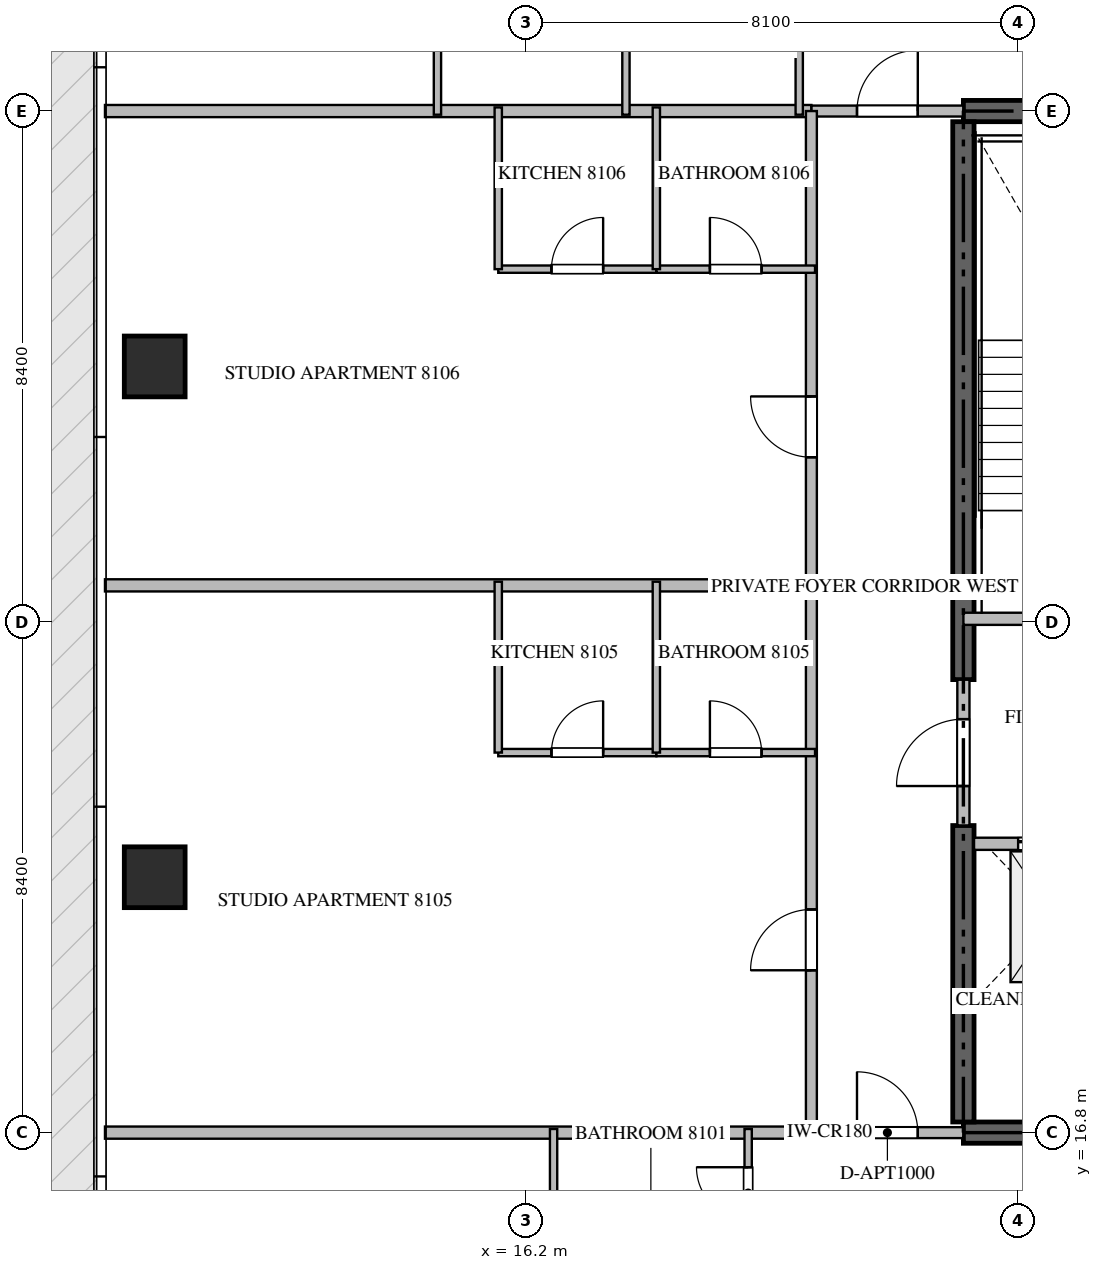
"""IFC4 building model, lengths in metres.
Left out: names, types, materials, properties, quantities, classifications, styles, units other than length and angle.
Written with IfcOpenShell. Run it as: python <this file> out.ifc"""

import sys

from ifc_helpers import new_model, si_unit, direction, frame, frame_2d, origin, origin_2d, place, context, subcontext, project, spatial, rectangle, extrude, source, transform, mapped, element, fill, save


model = new_model("IFC4")
c1 = context("Model", 3, precision=1e-05, world=origin(), true_north=direction((0.0, 1.0)))
c2 = subcontext(c1, "Body", "Model", "MODEL_VIEW")
j1 = project(units=[si_unit("LENGTHUNIT", "METRE"), si_unit("PLANEANGLEUNIT", "RADIAN")], contexts=[c1])
p1 = place(None, origin())
s1 = spatial("IfcSite", under=j1, at=p1, CompositionType="ELEMENT")
p2 = place(p1, origin())
s2 = spatial("IfcBuilding", under=s1, at=p2, CompositionType="ELEMENT")
p3 = place(p2, frame((0.0, 0.0, 325.85)))
s3 = spatial("IfcBuildingStorey", under=s2, at=p3, CompositionType="ELEMENT", Elevation=325.85)
for number, where, z_axis, x_axis in (
    (1, (23.4, 16.8, -0.26), (0.0, 0.0, 1.0), (1.0, 0.0, 0.0)),
    (2, (41.4, 33.6, -0.26), (0.0, 0.0, 1.0), (-1.0, 0.0, 0.0)),
):
    element("IfcWall", number, at=place(p3, frame(where, z_axis=z_axis, x_axis=x_axis)), inside=s3, PredefinedType="SHEAR", context=c2, shape_type="SweptSolid", body=[
        extrude(rectangle(XDim=18.0, YDim=0.35, at=frame_2d((9.0, 0.0))), origin(), (0.0, 0.0, 1.0), 4.048),
    ])
p4 = place(p3, frame((23.4, 16.975, -0.26), z_axis=(0.0, 0.0, 1.0), x_axis=(0.0, 1.0, 0.0)))
e3 = element("IfcWall", 3, at=p4, inside=s3, PredefinedType="SHEAR", context=c2, shape_type="SweptSolid", body=[
    extrude(rectangle(XDim=4.875, YDim=0.35, at=frame_2d((2.438, 0.0))), origin(), (0.0, 0.0, 1.0), 4.048),
])
p5 = place(p3, frame((23.4, 24.25, -0.26), z_axis=(0.0, 0.0, 1.0), x_axis=(0.0, 1.0, 0.0)))
e4 = element("IfcWall", 4, at=p5, inside=s3, PredefinedType="SHEAR", context=c2, shape_type="SweptSolid", body=[
    extrude(rectangle(XDim=9.175, YDim=0.35, at=frame_2d((4.587, 0.0))), origin(), (0.0, 0.0, 1.0), 4.048),
])
m1 = source(origin(), c2, "Body", "SweptSolid", [
    extrude(rectangle(XDim=1.0, YDim=1.0, at=origin_2d()), origin(), (0.0, 0.0, 1.0), 4.05),
])
for number, where, z_axis, x_axis in (
    (5, (10.1, 21.0, -0.26), (0.0, 0.0, 1.0), (1.0, 0.0, 0.0)),
    (6, (10.1, 29.4, -0.26), (0.0, 0.0, 1.0), (1.0, 0.0, 0.0)),
):
    element("IfcColumn", number, at=place(p3, frame(where, z_axis=z_axis, x_axis=x_axis)), inside=s3, PredefinedType="COLUMN", context=c2, shape_type="MappedRepresentation", body=[
        mapped(m1, transform((0.0, 0.0, 0.0), scale=1.0)),
    ])
p6 = place(p3, frame((23.4, 25.25, 0.0), z_axis=(0.0, 0.0, 1.0), x_axis=(1.0, 0.0, 0.0)))
e7 = element("IfcWall", 7, at=p6, inside=s3, PredefinedType="STANDARD", context=c2, shape_type="SweptSolid", body=[
    extrude(rectangle(XDim=4.45, YDim=0.2, at=frame_2d((2.225, 0.0))), origin(), (0.0, 0.0, 1.0), 3.79),
])
p7 = place(p6, frame((1.65, 0.0, 0.0)))
e8 = element("IfcOpeningElement", 8, at=p7, cuts=e7, PredefinedType="OPENING", context=c2, shape_type="SweptSolid", body=[
    extrude(rectangle(XDim=1.1, YDim=2.15, at=frame_2d((0.55, 1.075))), frame((0.0, 0.11, 0.0), z_axis=(0.0, -1.0, 0.0), x_axis=(1.0, 0.0, 0.0)), (0.0, 0.0, 1.0), 0.22),
])
p8 = place(p3, frame((23.575, 21.55, 0.0), z_axis=(0.0, 0.0, 1.0), x_axis=(1.0, 0.0, 0.0)))
e9 = element("IfcWall", 9, at=p8, inside=s3, PredefinedType="STANDARD", context=c2, shape_type="SweptSolid", body=[
    extrude(rectangle(XDim=2.475, YDim=0.2, at=frame_2d((1.238, 0.0))), origin(), (0.0, 0.0, 1.0), 3.79),
])
p9 = place(p8, frame((0.725, 0.0, 0.0)))
e10 = element("IfcOpeningElement", 10, at=p9, cuts=e9, PredefinedType="OPENING", context=c2, shape_type="SweptSolid", body=[
    extrude(rectangle(XDim=1.2, YDim=2.2, at=frame_2d((0.6, 1.1))), frame((0.0, 0.11, 0.0), z_axis=(0.0, -1.0, 0.0), x_axis=(1.0, 0.0, 0.0)), (0.0, 0.0, 1.0), 0.22),
])
p10 = place(p3, frame((23.575, 19.05, 0.0), z_axis=(0.0, 0.0, 1.0), x_axis=(1.0, 0.0, 0.0)))
e11 = element("IfcWall", 11, at=p10, inside=s3, PredefinedType="STANDARD", context=c2, shape_type="SweptSolid", body=[
    extrude(rectangle(XDim=2.475, YDim=0.2, at=frame_2d((1.238, 0.0))), origin(), (0.0, 0.0, 1.0), 3.79),
])
p11 = place(p3, frame((23.4, 21.852, 0.0), z_axis=(0.0, 0.0, 1.0), x_axis=(0.0, 1.0, 0.0)))
e12 = element("IfcWall", 12, at=p11, inside=s3, PredefinedType="STANDARD", context=c2, shape_type="SweptSolid", body=[
    extrude(rectangle(XDim=2.396, YDim=0.2, at=frame_2d((1.198, 0.0))), origin(), (0.0, 0.0, 1.0), 3.79),
])
p12 = place(p11, frame((0.648, 0.0, 0.0)))
e13 = element("IfcOpeningElement", 13, at=p12, cuts=e12, PredefinedType="OPENING", context=c2, shape_type="SweptSolid", body=[
    extrude(rectangle(XDim=1.1, YDim=2.15, at=frame_2d((0.55, 1.075))), frame((0.0, 0.11, 0.0), z_axis=(0.0, -1.0, 0.0), x_axis=(1.0, 0.0, 0.0)), (0.0, 0.0, 1.0), 0.22),
])
p13 = place(p3, frame((9.282, 25.8, 0.0), z_axis=(0.0, 0.0, 1.0), x_axis=(1.0, 0.0, 0.0)))
e14 = element("IfcWall", 14, at=p13, inside=s3, PredefinedType="PARTITIONING", context=c2, shape_type="SweptSolid", body=[
    extrude(rectangle(XDim=11.738, YDim=0.2, at=frame_2d((5.869, 0.0))), origin(), (0.0, 0.0, 1.0), 3.79),
])
for number, where, z_axis, x_axis in (
    (15, (9.282, 16.8, 0.0), (0.0, 0.0, 1.0), (1.0, 0.0, 0.0)),
    (16, (9.282, 33.6, 0.0), (0.0, 0.0, 1.0), (1.0, 0.0, 0.0)),
):
    element("IfcWall", number, at=place(p3, frame(where, z_axis=z_axis, x_axis=x_axis)), inside=s3, PredefinedType="PARTITIONING", context=c2, shape_type="SweptSolid", body=[
        extrude(rectangle(XDim=11.618, YDim=0.2, at=frame_2d((5.809, 0.0))), origin(), (0.0, 0.0, 1.0), 3.79),
    ])
p14 = place(p3, frame((20.902, 16.8, 0.0), z_axis=(0.0, 0.0, 1.0), x_axis=(1.0, 0.0, 0.0)))
e17 = element("IfcWall", 17, at=p14, inside=s3, PredefinedType="PARTITIONING", context=c2, shape_type="SweptSolid", body=[
    extrude(rectangle(XDim=2.496, YDim=0.18, at=frame_2d((1.248, 0.0))), origin(), (0.0, 0.0, 1.0), 3.79),
])
p15 = place(p14, frame((0.748, 0.0, 0.0)))
e18 = element("IfcOpeningElement", 18, at=p15, cuts=e17, PredefinedType="OPENING", context=c2, shape_type="SweptSolid", body=[
    extrude(rectangle(XDim=1.0, YDim=2.15, at=frame_2d((0.5, 1.075))), frame((0.0, 0.1, 0.0), z_axis=(0.0, -1.0, 0.0), x_axis=(1.0, 0.0, 0.0)), (0.0, 0.0, 1.0), 0.2),
])
p16 = place(p3, frame((20.902, 33.6, 0.0), z_axis=(0.0, 0.0, 1.0), x_axis=(1.0, 0.0, 0.0)))
e19 = element("IfcWall", 19, at=p16, inside=s3, PredefinedType="PARTITIONING", context=c2, shape_type="SweptSolid", body=[
    extrude(rectangle(XDim=2.496, YDim=0.18, at=frame_2d((1.248, 0.0))), origin(), (0.0, 0.0, 1.0), 3.79),
])
p17 = place(p16, frame((0.748, 0.0, 0.0)))
e20 = element("IfcOpeningElement", 20, at=p17, cuts=e19, PredefinedType="OPENING", context=c2, shape_type="SweptSolid", body=[
    extrude(rectangle(XDim=1.0, YDim=2.15, at=frame_2d((0.5, 1.075))), frame((0.0, 0.1, 0.0), z_axis=(0.0, -1.0, 0.0), x_axis=(1.0, 0.0, 0.0)), (0.0, 0.0, 1.0), 0.2),
])
p18 = place(p3, frame((20.9, 16.8, 0.0), z_axis=(0.0, 0.0, 1.0), x_axis=(0.0, 1.0, 0.0)))
e21 = element("IfcWall", 21, at=p18, inside=s3, PredefinedType="PARTITIONING", context=c2, shape_type="SweptSolid", body=[
    extrude(rectangle(XDim=16.8, YDim=0.18, at=frame_2d((8.4, 0.0))), origin(), (0.0, 0.0, 1.0), 3.79),
])
p19 = place(p18, frame((2.67, 0.0, 0.0)))
e22 = element("IfcOpeningElement", 22, at=p19, cuts=e21, PredefinedType="OPENING", context=c2, shape_type="SweptSolid", body=[
    extrude(rectangle(XDim=1.0, YDim=2.15, at=frame_2d((0.5, 1.075))), frame((0.0, 0.1, 0.0), z_axis=(0.0, -1.0, 0.0), x_axis=(1.0, 0.0, 0.0)), (0.0, 0.0, 1.0), 0.2),
])
p20 = place(p18, frame((11.107, 0.0, 0.0)))
e23 = element("IfcOpeningElement", 23, at=p20, cuts=e21, PredefinedType="OPENING", context=c2, shape_type="SweptSolid", body=[
    extrude(rectangle(XDim=1.0, YDim=2.15, at=frame_2d((0.5, 1.075))), frame((0.0, 0.1, 0.0), z_axis=(0.0, -1.0, 0.0), x_axis=(1.0, 0.0, 0.0)), (0.0, 0.0, 1.0), 0.2),
])
p21 = place(p3, frame((16.66, 14.75, 0.0), z_axis=(0.0, 0.0, 1.0), x_axis=(0.0, 1.0, 0.0)))
e24 = element("IfcWall", 24, at=p21, inside=s3, PredefinedType="PARTITIONING", context=c2, shape_type="SweptSolid", body=[
    extrude(rectangle(XDim=2.11, YDim=0.12, at=frame_2d((1.055, 0.0))), origin(), (0.0, 0.0, 1.0), 3.79),
])
p22 = place(p3, frame((19.86, 14.752, 0.0), z_axis=(0.0, 0.0, 1.0), x_axis=(0.0, 1.0, 0.0)))
e25 = element("IfcWall", 25, at=p22, inside=s3, PredefinedType="PARTITIONING", context=c2, shape_type="SweptSolid", body=[
    extrude(rectangle(XDim=2.108, YDim=0.12, at=frame_2d((1.054, 0.0))), origin(), (0.0, 0.0, 1.0), 3.79),
])
p23 = place(p22, frame((0.629, 0.0, 0.0)))
e26 = element("IfcOpeningElement", 26, at=p23, cuts=e25, PredefinedType="OPENING", context=c2, shape_type="SweptSolid", body=[
    extrude(rectangle(XDim=0.85, YDim=2.1, at=frame_2d((0.425, 1.05))), frame((0.0, 0.07, 0.0), z_axis=(0.0, -1.0, 0.0), x_axis=(1.0, 0.0, 0.0)), (0.0, 0.0, 1.0), 0.14),
])
p24 = place(p3, frame((20.7, 36.35, 0.0), z_axis=(0.0, 0.0, 1.0), x_axis=(0.0, -1.0, 0.0)))
e27 = element("IfcWall", 27, at=p24, inside=s3, PredefinedType="PARTITIONING", context=c2, shape_type="SweptSolid", body=[
    extrude(rectangle(XDim=2.81, YDim=0.12, at=frame_2d((1.405, 0.0))), origin(), (0.0, 0.0, 1.0), 3.79),
])
p25 = place(p3, frame((14.75, 37.807, 0.0), z_axis=(0.0, 0.0, 1.0), x_axis=(0.0, -1.0, 0.0)))
e28 = element("IfcWall", 28, at=p25, inside=s3, PredefinedType="PARTITIONING", context=c2, shape_type="SweptSolid", body=[
    extrude(rectangle(XDim=4.267, YDim=0.12, at=frame_2d((2.133, 0.0))), origin(), (0.0, 0.0, 1.0), 3.79),
])
p26 = place(p3, frame((17.85, 37.805, 0.0), z_axis=(0.0, 0.0, 1.0), x_axis=(0.0, -1.0, 0.0)))
e29 = element("IfcWall", 29, at=p26, inside=s3, PredefinedType="PARTITIONING", context=c2, shape_type="SweptSolid", body=[
    extrude(rectangle(XDim=4.265, YDim=0.12, at=frame_2d((2.132, 0.0))), origin(), (0.0, 0.0, 1.0), 3.372),
])
p27 = place(p26, frame((1.848, 0.0, 0.0)))
e30 = element("IfcOpeningElement", 30, at=p27, cuts=e29, PredefinedType="OPENING", context=c2, shape_type="SweptSolid", body=[
    extrude(rectangle(XDim=0.85, YDim=2.1, at=frame_2d((0.425, 1.05))), frame((0.0, 0.07, 0.0), z_axis=(0.0, -1.0, 0.0), x_axis=(1.0, 0.0, 0.0)), (0.0, 0.0, 1.0), 0.14),
])
p28 = place(p3, frame((15.75, 23.05, 0.0), z_axis=(0.0, 0.0, 1.0), x_axis=(1.0, 0.0, 0.0)))
e31 = element("IfcWall", 31, at=p28, inside=s3, PredefinedType="PARTITIONING", context=c2, shape_type="SweptSolid", body=[
    extrude(rectangle(XDim=2.6, YDim=0.12, at=frame_2d((1.3, 0.0))), origin(), (0.0, 0.0, 1.0), 3.79),
])
p29 = place(p28, frame((0.875, 0.0, 0.0)))
e32 = element("IfcOpeningElement", 32, at=p29, cuts=e31, PredefinedType="OPENING", context=c2, shape_type="SweptSolid", body=[
    extrude(rectangle(XDim=0.85, YDim=2.1, at=frame_2d((0.425, 1.05))), frame((0.0, 0.07, 0.0), z_axis=(0.0, -1.0, 0.0), x_axis=(1.0, 0.0, 0.0)), (0.0, 0.0, 1.0), 0.14),
])
p30 = place(p3, frame((18.352, 23.05, 0.0), z_axis=(0.0, 0.0, 1.0), x_axis=(1.0, 0.0, 0.0)))
e33 = element("IfcWall", 33, at=p30, inside=s3, PredefinedType="PARTITIONING", context=c2, shape_type="SweptSolid", body=[
    extrude(rectangle(XDim=2.608, YDim=0.12, at=frame_2d((1.304, 0.0))), origin(), (0.0, 0.0, 1.0), 3.79),
])
p31 = place(p30, frame((0.879, 0.0, 0.0)))
e34 = element("IfcOpeningElement", 34, at=p31, cuts=e33, PredefinedType="OPENING", context=c2, shape_type="SweptSolid", body=[
    extrude(rectangle(XDim=0.85, YDim=2.1, at=frame_2d((0.425, 1.05))), frame((0.0, 0.07, 0.0), z_axis=(0.0, -1.0, 0.0), x_axis=(1.0, 0.0, 0.0)), (0.0, 0.0, 1.0), 0.14),
])
for number, where, z_axis, x_axis in (
    (35, (18.35, 23.05, 0.0), (0.0, 0.0, 1.0), (0.0, 1.0, 0.0)),
    (36, (15.75, 23.05, 0.0), (0.0, 0.0, 1.0), (0.0, 1.0, 0.0)),
):
    element("IfcWall", number, at=place(p3, frame(where, z_axis=z_axis, x_axis=x_axis)), inside=s3, PredefinedType="PARTITIONING", context=c2, shape_type="SweptSolid", body=[
        extrude(rectangle(XDim=2.81, YDim=0.12, at=frame_2d((1.405, 0.0))), origin(), (0.0, 0.0, 1.0), 3.79),
    ])
p32 = place(p3, frame((15.75, 31.0, 0.0), z_axis=(0.0, 0.0, 1.0), x_axis=(1.0, 0.0, 0.0)))
e37 = element("IfcWall", 37, at=p32, inside=s3, PredefinedType="PARTITIONING", context=c2, shape_type="SweptSolid", body=[
    extrude(rectangle(XDim=2.6, YDim=0.12, at=frame_2d((1.3, 0.0))), origin(), (0.0, 0.0, 1.0), 3.79),
])
p33 = place(p32, frame((0.875, 0.0, 0.0)))
e38 = element("IfcOpeningElement", 38, at=p33, cuts=e37, PredefinedType="OPENING", context=c2, shape_type="SweptSolid", body=[
    extrude(rectangle(XDim=0.85, YDim=2.1, at=frame_2d((0.425, 1.05))), frame((0.0, 0.07, 0.0), z_axis=(0.0, -1.0, 0.0), x_axis=(1.0, 0.0, 0.0)), (0.0, 0.0, 1.0), 0.14),
])
p34 = place(p3, frame((18.352, 31.0, 0.0), z_axis=(0.0, 0.0, 1.0), x_axis=(1.0, 0.0, 0.0)))
e39 = element("IfcWall", 39, at=p34, inside=s3, PredefinedType="PARTITIONING", context=c2, shape_type="SweptSolid", body=[
    extrude(rectangle(XDim=2.608, YDim=0.12, at=frame_2d((1.304, 0.0))), origin(), (0.0, 0.0, 1.0), 3.79),
])
p35 = place(p34, frame((0.879, 0.0, 0.0)))
e40 = element("IfcOpeningElement", 40, at=p35, cuts=e39, PredefinedType="OPENING", context=c2, shape_type="SweptSolid", body=[
    extrude(rectangle(XDim=0.85, YDim=2.1, at=frame_2d((0.425, 1.05))), frame((0.0, 0.07, 0.0), z_axis=(0.0, -1.0, 0.0), x_axis=(1.0, 0.0, 0.0)), (0.0, 0.0, 1.0), 0.14),
])
for number, where, z_axis, x_axis in (
    (41, (18.35, 31.0, 0.0), (0.0, 0.0, 1.0), (0.0, 1.0, 0.0)),
    (42, (15.75, 31.0, 0.0), (0.0, 0.0, 1.0), (0.0, 1.0, 0.0)),
):
    element("IfcWall", number, at=place(p3, frame(where, z_axis=z_axis, x_axis=x_axis)), inside=s3, PredefinedType="PARTITIONING", context=c2, shape_type="SweptSolid", body=[
        extrude(rectangle(XDim=2.66, YDim=0.12, at=frame_2d((1.33, 0.0))), origin(), (0.0, 0.0, 1.0), 3.79),
    ])
m2 = source(origin(), c2, "Body", "SweptSolid", [
    extrude(rectangle(XDim=1.2, YDim=2.2, at=frame_2d((0.6, 1.1))), frame((0.0, 0.025, 0.0), z_axis=(0.0, -1.0, 0.0), x_axis=(1.0, 0.0, 0.0)), (0.0, 0.0, 1.0), 0.05),
])
p36 = place(p9, origin())
e43 = element("IfcDoor", 43, at=p36, inside=s3, OperationType="DOUBLE_DOOR_SLIDING", PredefinedType="DOOR", context=c2, shape_type="MappedRepresentation", body=[
    mapped(m2, transform((0.0, 0.0, 0.0), scale=1.0)),
])
fill(e10, e43)
m3 = source(origin(), c2, "Body", "SweptSolid", [
    extrude(rectangle(XDim=1.1, YDim=2.15, at=frame_2d((0.55, 1.075))), frame((0.0, 0.025, 0.0), z_axis=(0.0, -1.0, 0.0), x_axis=(1.0, 0.0, 0.0)), (0.0, 0.0, 1.0), 0.05),
])
p37 = place(p12, origin())
e44 = element("IfcDoor", 44, at=p37, inside=s3, OperationType="SINGLE_SWING_LEFT", PredefinedType="DOOR", context=c2, shape_type="MappedRepresentation", body=[
    mapped(m3, transform((0.0, 0.0, 0.0), scale=1.0)),
])
fill(e13, e44)
m4 = source(origin(), c2, "Body", "SweptSolid", [
    extrude(rectangle(XDim=1.0, YDim=2.15, at=frame_2d((0.5, 1.075))), frame((0.0, 0.025, 0.0), z_axis=(0.0, -1.0, 0.0), x_axis=(1.0, 0.0, 0.0)), (0.0, 0.0, 1.0), 0.05),
])
p38 = place(p15, origin())
e45 = element("IfcDoor", 45, at=p38, inside=s3, OperationType="SINGLE_SWING_LEFT", PredefinedType="DOOR", context=c2, shape_type="MappedRepresentation", body=[
    mapped(m4, transform((0.0, 0.0, 0.0), scale=1.0)),
])
fill(e18, e45)
p39 = place(p17, origin())
e46 = element("IfcDoor", 46, at=p39, inside=s3, OperationType="SINGLE_SWING_RIGHT", PredefinedType="DOOR", context=c2, shape_type="MappedRepresentation", body=[
    mapped(m4, transform((0.0, 0.0, 0.0), scale=1.0)),
])
fill(e20, e46)
p40 = place(p19, origin())
e47 = element("IfcDoor", 47, at=p40, inside=s3, OperationType="SINGLE_SWING_LEFT", PredefinedType="DOOR", context=c2, shape_type="MappedRepresentation", body=[
    mapped(m4, transform((0.0, 0.0, 0.0), scale=1.0)),
])
fill(e22, e47)
p41 = place(p20, origin())
e48 = element("IfcDoor", 48, at=p41, inside=s3, OperationType="SINGLE_SWING_RIGHT", PredefinedType="DOOR", context=c2, shape_type="MappedRepresentation", body=[
    mapped(m4, transform((0.0, 0.0, 0.0), scale=1.0)),
])
fill(e23, e48)
m5 = source(origin(), c2, "Body", "SweptSolid", [
    extrude(rectangle(XDim=0.85, YDim=2.1, at=frame_2d((0.425, 1.05))), frame((0.0, 0.025, 0.0), z_axis=(0.0, -1.0, 0.0), x_axis=(1.0, 0.0, 0.0)), (0.0, 0.0, 1.0), 0.05),
])
p42 = place(p23, origin())
e49 = element("IfcDoor", 49, at=p42, inside=s3, OperationType="SINGLE_SWING_RIGHT", PredefinedType="DOOR", context=c2, shape_type="MappedRepresentation", body=[
    mapped(m5, transform((0.0, 0.0, 0.0), scale=1.0)),
])
fill(e26, e49)
p43 = place(p29, origin())
e50 = element("IfcDoor", 50, at=p43, inside=s3, OperationType="SINGLE_SWING_RIGHT", PredefinedType="DOOR", context=c2, shape_type="MappedRepresentation", body=[
    mapped(m5, transform((0.0, 0.0, 0.0), scale=1.0)),
])
fill(e32, e50)
p44 = place(p31, origin())
e51 = element("IfcDoor", 51, at=p44, inside=s3, OperationType="SINGLE_SWING_LEFT", PredefinedType="DOOR", context=c2, shape_type="MappedRepresentation", body=[
    mapped(m5, transform((0.0, 0.0, 0.0), scale=1.0)),
])
fill(e34, e51)
p45 = place(p33, origin())
e52 = element("IfcDoor", 52, at=p45, inside=s3, OperationType="SINGLE_SWING_RIGHT", PredefinedType="DOOR", context=c2, shape_type="MappedRepresentation", body=[
    mapped(m5, transform((0.0, 0.0, 0.0), scale=1.0)),
])
fill(e38, e52)
p46 = place(p35, origin())
e53 = element("IfcDoor", 53, at=p46, inside=s3, OperationType="SINGLE_SWING_LEFT", PredefinedType="DOOR", context=c2, shape_type="MappedRepresentation", body=[
    mapped(m5, transform((0.0, 0.0, 0.0), scale=1.0)),
])
fill(e40, e53)
save(model, sys.argv[1])
